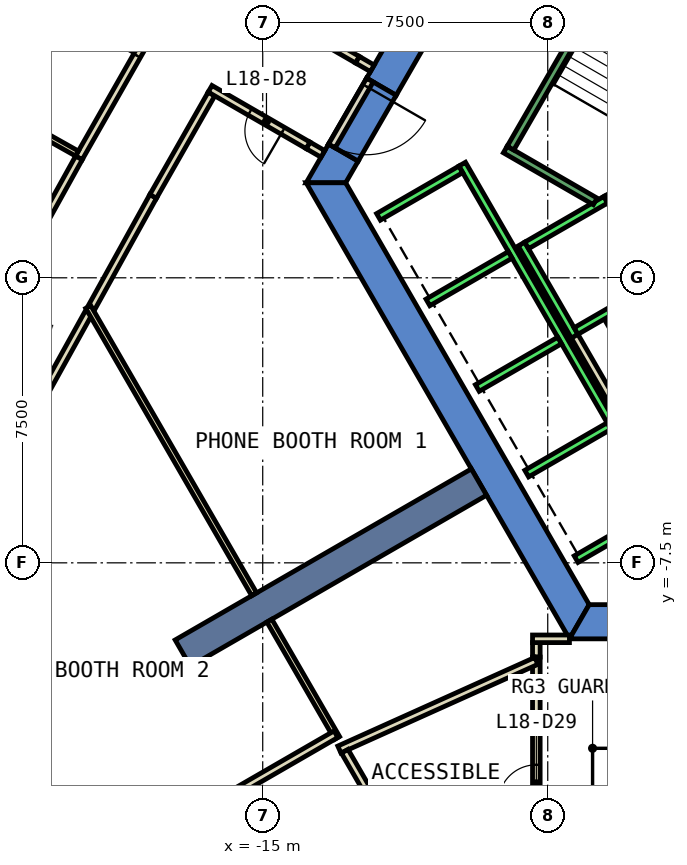
"""IFC4 building model, lengths in metres.
Left out: names, types, materials, properties, quantities, classifications, styles, units other than length and angle.
Written with IfcOpenShell. Run it as: python <this file> out.ifc"""

import sys

from ifc_helpers import new_model, si_unit, direction, frame, frame_2d, origin, place, context, subcontext, project, spatial, polyline, rectangle, outline, extrude, element, fill, save


model = new_model("IFC4")
c1 = context("Model", 3, precision=1e-05, world=origin(), true_north=direction((0.0, 1.0)))
c2 = subcontext(c1, "Body", "Model", "MODEL_VIEW")
j1 = project(units=[si_unit("LENGTHUNIT", "METRE"), si_unit("PLANEANGLEUNIT", "RADIAN")], contexts=[c1])
p1 = place(None, origin())
s1 = spatial("IfcSite", under=j1, at=p1, CompositionType="ELEMENT")
p2 = place(p1, origin())
s2 = spatial("IfcBuilding", under=s1, at=p2, CompositionType="ELEMENT")
p3 = place(p2, frame((0.0, 0.0, 86.6)))
s3 = spatial("IfcBuildingStorey", under=s2, at=p3, CompositionType="ELEMENT", Elevation=86.6)
p4 = place(p3, frame((0.0, 0.0, -0.6)))
e1 = element("IfcWall", 1, at=p4, inside=s3, PredefinedType="SHEAR", context=c2, shape_type="SweptSolid", body=[
    extrude(outline(polyline([(-12.267, 5.252), (-11.488, 4.802), (-6.409, 13.6), (-6.928, 14.5), (-12.267, 5.252)])), origin(), (0.0, 0.0, 1.0), 4.4),
])
p5 = place(p3, frame((0.0, 0.0, -0.6)))
e2 = element("IfcWall", 2, at=p5, inside=s3, PredefinedType="SHEAR", context=c2, shape_type="SweptSolid", body=[
    extrude(outline(polyline([(-12.488, 3.07), (-13.267, 3.52), (-13.856, 2.5), (-12.817, 2.5), (-12.488, 3.07)])), origin(), (0.0, 0.0, 1.0), 4.4),
])
p6 = place(p3, frame((0.0, 0.0, 3.6)))
e3 = element("IfcWall", 3, at=p6, inside=s3, PredefinedType="SHEAR", context=c2, shape_type="SweptSolid", body=[
    extrude(outline(polyline([(-13.267, 3.52), (-12.488, 3.07), (-11.488, 4.802), (-12.267, 5.252), (-13.267, 3.52)])), origin(), (0.0, 0.0, 1.0), 0.2),
])
p7 = place(p3, frame((0.0, 0.0, -0.6)))
e4 = element("IfcWall", 4, at=p7, inside=s3, PredefinedType="SHEAR", context=c2, shape_type="SweptSolid", body=[
    extrude(outline(polyline([(-13.856, 2.5), (-6.928, -9.5), (-6.409, -8.6), (-12.817, 2.5), (-13.856, 2.5)])), origin(), (0.0, 0.0, 1.0), 4.4),
])
p8 = place(p3, frame((0.0, 0.0, -0.6)))
e5 = element("IfcWall", 5, at=p8, inside=s3, PredefinedType="SHEAR", context=c2, shape_type="SweptSolid", body=[
    extrude(outline(polyline([(3.75, -9.5), (3.75, -8.6), (-6.409, -8.6), (-6.928, -9.5), (3.75, -9.5)])), origin(), (0.0, 0.0, 1.0), 4.4),
])
p9 = place(p3, frame((-9.31, -5.375, -0.6), z_axis=(0.0, 0.0, 1.0), x_axis=(-0.866017533419, -0.500013631625, 0.0)))
e6 = element("IfcWall", 6, at=p9, inside=s3, PredefinedType="SHEAR", context=c2, shape_type="SweptSolid", body=[
    extrude(rectangle(XDim=9.0, YDim=0.8, at=frame_2d((4.5, 0.0))), origin(), (0.0, 0.0, 1.0), 4.4),
])
p10 = place(p3, frame((-15.098, 7.233, 0.0), z_axis=(0.0, 0.0, 1.0), x_axis=(0.866101363304, -0.499868411168, 0.0)))
e7 = element("IfcWall", 7, at=p10, inside=s3, PredefinedType="PARTITIONING", context=c2, shape_type="SweptSolid", body=[
    extrude(rectangle(XDim=2.992, YDim=0.2, at=frame_2d((1.496, 0.0))), origin(), (0.0, 0.0, 1.0), 3.8),
])
p11 = place(p3, frame((-17.883, 2.143, 0.0), z_axis=(0.0, 0.0, 1.0), x_axis=(-0.484695523805, -0.874682942101, 0.0)))
e8 = element("IfcWall", 8, at=p11, inside=s3, PredefinedType="PARTITIONING", context=c2, shape_type="SweptSolid", body=[
    extrude(rectangle(XDim=3.349, YDim=0.2, at=frame_2d((1.674, 0.0))), origin(), (0.0, 0.0, 1.0), 3.8),
])
p12 = place(p3, frame((-13.417, 3.26, 0.0), z_axis=(0.0, 0.0, 1.0), x_axis=(-0.866032067792, 0.499988457423, 0.0)))
e9 = element("IfcWall", 9, at=p12, inside=s3, PredefinedType="PARTITIONING", context=c2, shape_type="SweptSolid", body=[
    extrude(rectangle(XDim=0.45, YDim=0.2, at=frame_2d((0.225, 0.0))), origin(), (0.0, 0.0, 1.0), 2.4),
])
p13 = place(p3, frame((-16.348, 4.837, 0.0), z_axis=(0.0, 0.0, 1.0), x_axis=(-0.495121026513, -0.868824015037, 0.0)))
e10 = element("IfcWall", 10, at=p13, inside=s3, PredefinedType="PARTITIONING", context=c2, shape_type="SweptSolid", body=[
    extrude(rectangle(XDim=3.101, YDim=0.2, at=frame_2d((1.55, 0.0))), origin(), (0.0, 0.0, 1.0), 3.8),
])
p14 = place(p3, frame((-19.579, -0.917, 0.0), z_axis=(0.0, 0.0, 1.0), x_axis=(-0.484700239797, -0.874680328772, 0.0)))
e11 = element("IfcWall", 11, at=p14, inside=s3, PredefinedType="PARTITIONING", context=c2, shape_type="SweptSolid", body=[
    extrude(rectangle(XDim=3.585, YDim=0.2, at=frame_2d((1.792, 0.0))), origin(), (0.0, 0.0, 1.0), 3.8),
])
p15 = place(p3, frame((-19.838, 3.156, 0.0), z_axis=(0.0, 0.0, 1.0), x_axis=(0.494978648769, 0.868905137091, 0.0)))
e12 = element("IfcWall", 12, at=p15, inside=s3, PredefinedType="PARTITIONING", context=c2, shape_type="SweptSolid", body=[
    extrude(rectangle(XDim=7.186, YDim=0.2, at=frame_2d((3.593, 0.0))), origin(), (0.0, 0.0, 1.0), 3.8),
])
p16 = place(p15, frame((3.093, 0.0, 0.0)))
e13 = element("IfcOpeningElement", 13, at=p16, cuts=e12, PredefinedType="OPENING", context=c2, shape_type="SweptSolid", body=[
    extrude(rectangle(XDim=1.0, YDim=2.1, at=frame_2d((0.5, 1.05))), frame((0.0, 0.11, 0.0), z_axis=(0.0, -1.0, 0.0), x_axis=(1.0, 0.0, 0.0)), (0.0, 0.0, 1.0), 0.22),
])
p17 = place(p3, frame((-23.284, -3.064, 0.0), z_axis=(0.0, 0.0, 1.0), x_axis=(0.48478560119, 0.874633020689, 0.0)))
e14 = element("IfcWall", 14, at=p17, inside=s3, PredefinedType="PARTITIONING", context=c2, shape_type="SweptSolid", body=[
    extrude(rectangle(XDim=7.11, YDim=0.2, at=frame_2d((3.555, 0.0))), origin(), (0.0, 0.0, 1.0), 3.8),
])
p18 = place(p17, frame((3.13, 0.0, 0.0)))
e15 = element("IfcOpeningElement", 15, at=p18, cuts=e14, PredefinedType="OPENING", context=c2, shape_type="SweptSolid", body=[
    extrude(rectangle(XDim=1.0, YDim=2.1, at=frame_2d((0.5, 1.05))), frame((0.0, 0.11, 0.0), z_axis=(0.0, -1.0, 0.0), x_axis=(1.0, 0.0, 0.0)), (0.0, 0.0, 1.0), 0.22),
])
p19 = place(p3, frame((-5.126, -2.422, 0.0), z_axis=(0.0, 0.0, 1.0), x_axis=(-0.500062241894, 0.865989465428, 0.0)))
e16 = element("IfcWall", 16, at=p19, inside=s3, PredefinedType="PARTITIONING", context=c2, shape_type="SweptSolid", body=[
    extrude(rectangle(XDim=1.7, YDim=0.2, at=frame_2d((0.85, 0.0))), origin(), (0.0, 0.0, 1.0), 3.8),
])
p20 = place(p3, frame((-5.492, -3.788, 0.0), z_axis=(0.0, 0.0, 1.0), x_axis=(-0.500008949224, 0.866020236886, 0.0)))
e17 = element("IfcWall", 17, at=p20, inside=s3, PredefinedType="PARTITIONING", context=c2, shape_type="SweptSolid", body=[
    extrude(rectangle(XDim=2.68, YDim=0.2, at=frame_2d((1.34, 0.0))), origin(), (0.0, 0.0, 1.0), 3.8),
])
p21 = place(p3, frame((-7.8, -9.98, 0.0), z_axis=(0.0, 0.0, 1.0), x_axis=(0.0, 1.0, 0.0)))
e18 = element("IfcWall", 18, at=p21, inside=s3, PredefinedType="PARTITIONING", context=c2, shape_type="SweptSolid", body=[
    extrude(rectangle(XDim=0.381, YDim=0.2, at=frame_2d((0.19, 0.0))), origin(), (0.0, 0.0, 1.0), 3.8),
])
p22 = place(p3, frame((-7.9, -9.499, 0.0), z_axis=(0.0, 0.0, 1.0), x_axis=(1.0, 0.0, 0.0)))
e19 = element("IfcWall", 19, at=p22, inside=s3, PredefinedType="PARTITIONING", context=c2, shape_type="SweptSolid", body=[
    extrude(rectangle(XDim=0.971, YDim=0.2, at=frame_2d((0.485, 0.0))), origin(), (0.0, 0.0, 1.0), 3.8),
])
p23 = place(p3, frame((-7.8, -16.649, 0.0), z_axis=(0.0, 0.0, 1.0), x_axis=(0.0, 1.0, 0.0)))
e20 = element("IfcWall", 20, at=p23, inside=s3, PredefinedType="PARTITIONING", context=c2, shape_type="SweptSolid", body=[
    extrude(rectangle(XDim=6.669, YDim=0.2, at=frame_2d((3.334, 0.0))), origin(), (0.0, 0.0, 1.0), 3.8),
])
p24 = place(p23, frame((2.835, 0.0, 0.0)))
e21 = element("IfcOpeningElement", 21, at=p24, cuts=e20, PredefinedType="OPENING", context=c2, shape_type="SweptSolid", body=[
    extrude(rectangle(XDim=1.0, YDim=2.1, at=frame_2d((0.5, 1.05))), frame((0.0, 0.11, 0.0), z_axis=(0.0, -1.0, 0.0), x_axis=(1.0, 0.0, 0.0)), (0.0, 0.0, 1.0), 0.22),
])
p25 = place(p3, frame((-7.8, -10.08, 0.0), z_axis=(0.0, 0.0, 1.0), x_axis=(-0.911938383636, -0.410327167577, 0.0)))
e22 = element("IfcWall", 22, at=p25, inside=s3, PredefinedType="PARTITIONING", context=c2, shape_type="SweptSolid", body=[
    extrude(rectangle(XDim=5.683, YDim=0.2, at=frame_2d((2.842, 0.0))), origin(), (0.0, 0.0, 1.0), 3.8),
])
p26 = place(p3, frame((-13.043, -12.108, 0.0), z_axis=(0.0, 0.0, 1.0), x_axis=(-0.499947764329, 0.866055559963, 0.0)))
e23 = element("IfcWall", 23, at=p26, inside=s3, PredefinedType="PARTITIONING", context=c2, shape_type="SweptSolid", body=[
    extrude(rectangle(XDim=3.564, YDim=0.15, at=frame_2d((1.782, 0.0))), origin(), (0.0, 0.0, 1.0), 3.8),
])
p27 = place(p3, frame((-10.458, -16.586, 0.0), z_axis=(0.0, 0.0, 1.0), x_axis=(-0.500121439648, 0.865955279218, 0.0)))
e24 = element("IfcWall", 24, at=p27, inside=s3, PredefinedType="PARTITIONING", context=c2, shape_type="SweptSolid", body=[
    extrude(rectangle(XDim=4.767, YDim=0.2, at=frame_2d((2.383, 0.0))), origin(), (0.0, 0.0, 1.0), 3.8),
])
p28 = place(p3, frame((-13.072, -12.009, 0.0), z_axis=(0.0, 0.0, 1.0), x_axis=(-0.865993734772, -0.500054848326, 0.0)))
e25 = element("IfcWall", 25, at=p28, inside=s3, PredefinedType="PARTITIONING", context=c2, shape_type="SweptSolid", body=[
    extrude(rectangle(XDim=8.583, YDim=0.2, at=frame_2d((4.292, 0.0))), origin(), (0.0, 0.0, 1.0), 3.8),
])
p29 = place(p3, frame((-19.888, 3.27, 0.0), z_axis=(0.0, 0.0, 1.0), x_axis=(-0.871789386467, 0.489880868828, 0.0)))
e26 = element("IfcWall", 26, at=p29, inside=s3, PredefinedType="PARTITIONING", context=c2, shape_type="SweptSolid", body=[
    extrude(rectangle(XDim=5.73, YDim=0.15, at=frame_2d((2.865, 0.0))), origin(), (0.0, 0.0, 1.0), 3.8),
])
p30 = place(p3, frame((-12.18, 5.202, 0.0), z_axis=(0.0, 0.0, 1.0), x_axis=(-0.50002537861, -0.866010750942, 0.0)))
e27 = element("IfcWall", 27, at=p30, inside=s3, PredefinedType="PARTITIONING", context=c2, shape_type="SweptSolid", body=[
    extrude(rectangle(XDim=2.0, YDim=0.2, at=frame_2d((1.0, 0.0))), origin(), (0.0, 0.0, 1.0), 2.4),
])
p31 = place(p30, frame((0.19, 0.0, 0.0)))
e28 = element("IfcOpeningElement", 28, at=p31, cuts=e27, PredefinedType="OPENING", context=c2, shape_type="SweptSolid", body=[
    extrude(rectangle(XDim=1.8, YDim=2.1, at=frame_2d((0.9, 1.05))), frame((0.0, 0.11, 0.0), z_axis=(0.0, -1.0, 0.0), x_axis=(1.0, 0.0, 0.0)), (0.0, 0.0, 1.0), 0.22),
])
p32 = place(p3, frame((-15.225, -8.328, 0.0), z_axis=(0.0, 0.0, 1.0), x_axis=(-0.500038648455, 0.866003088939, 0.0)))
e29 = element("IfcWall", 29, at=p32, inside=s3, PredefinedType="PARTITIONING", context=c2, shape_type="SweptSolid", body=[
    extrude(rectangle(XDim=8.733, YDim=0.15, at=frame_2d((4.367, 0.0))), origin(), (0.0, 0.0, 1.0), 3.8),
])
p33 = place(p3, frame((-12.506, 5.737, 0.0), z_axis=(0.0, 0.0, 1.0), x_axis=(0.865624510465, -0.500693725627, 0.0)))
e30 = element("IfcWall", 30, at=p33, inside=s3, PredefinedType="PARTITIONING", context=c2, shape_type="SweptSolid", body=[
    extrude(rectangle(XDim=0.449, YDim=0.2, at=frame_2d((0.225, 0.0))), origin(), (0.0, 0.0, 1.0), 2.4),
])
p34 = place(p3, frame((-13.807, 3.485, 0.0), z_axis=(0.0, 0.0, 1.0), x_axis=(-0.865947944451, 0.500134139508, 0.0)))
e31 = element("IfcWall", 31, at=p34, inside=s3, PredefinedType="PARTITIONING", context=c2, shape_type="SweptSolid", body=[
    extrude(rectangle(XDim=2.977, YDim=0.2, at=frame_2d((1.489, 0.0))), origin(), (0.0, 0.0, 1.0), 3.8),
])
p35 = place(p34, frame((0.764, 0.0, 0.0)))
e32 = element("IfcOpeningElement", 32, at=p35, cuts=e31, PredefinedType="OPENING", context=c2, shape_type="SweptSolid", body=[
    extrude(rectangle(XDim=1.0, YDim=2.1, at=frame_2d((0.5, 1.05))), frame((0.0, 0.11, 0.0), z_axis=(0.0, -1.0, 0.0), x_axis=(1.0, 0.0, 0.0)), (0.0, 0.0, 1.0), 0.22),
])
p36 = place(p3, frame((-5.94, 2.188, 0.0), z_axis=(0.0, 0.0, 1.0), x_axis=(0.49994636267, -0.866056369097, 0.0)))
e33 = element("IfcWall", 33, at=p36, inside=s3, PredefinedType="STANDARD", context=c2, shape_type="SweptSolid", body=[
    extrude(rectangle(XDim=2.8, YDim=0.2, at=frame_2d((1.4, 0.0))), origin(), (0.0, 0.0, 1.0), 3.8),
])
p37 = place(p36, frame((1.225, 0.0, 0.0)))
e34 = element("IfcOpeningElement", 34, at=p37, cuts=e33, PredefinedType="OPENING", context=c2, shape_type="SweptSolid", body=[
    extrude(rectangle(XDim=1.1, YDim=2.1, at=frame_2d((0.55, 1.05))), frame((0.0, 0.11, 0.0), z_axis=(0.0, -1.0, 0.0), x_axis=(1.0, 0.0, 0.0)), (0.0, 0.0, 1.0), 0.22),
])
p38 = place(p3, frame((-8.192, 0.888, 0.0), z_axis=(0.0, 0.0, 1.0), x_axis=(0.49994636267, -0.866056369097, 0.0)))
e35 = element("IfcWall", 35, at=p38, inside=s3, PredefinedType="STANDARD", context=c2, shape_type="SweptSolid", body=[
    extrude(rectangle(XDim=2.8, YDim=0.2, at=frame_2d((1.4, 0.0))), origin(), (0.0, 0.0, 1.0), 3.8),
])
for number, where, z_axis, x_axis in (
    (36, (-5.977, 2.052, 0.0), (0.0, 0.0, 1.0), (-0.866, -0.5, 0.0)),
    (37, (-4.677, -0.2, 0.0), (0.0, 0.0, 1.0), (-0.866, -0.5, 0.0)),
):
    element("IfcWall", number, at=place(p3, frame(where, z_axis=z_axis, x_axis=x_axis)), inside=s3, PredefinedType="STANDARD", context=c2, shape_type="SweptSolid", body=[
        extrude(rectangle(XDim=2.399, YDim=0.2, at=frame_2d((1.2, 0.0))), origin(), (0.0, 0.0, 1.0), 3.8),
    ])
p39 = place(p3, frame((-9.751, 2.99, 0.0), z_axis=(0.0, 0.0, 1.0), x_axis=(0.50000090737, -0.866024879913, 0.0)))
e38 = element("IfcWall", 38, at=p39, inside=s3, PredefinedType="STANDARD", context=c2, shape_type="SweptSolid", body=[
    extrude(rectangle(XDim=10.6, YDim=0.2, at=frame_2d((5.3, 0.0))), origin(), (0.0, 0.0, 1.0), 3.8),
])
p40 = place(p3, frame((-9.788, 2.853, 0.0), z_axis=(0.0, 0.0, 1.0), x_axis=(-0.865998541277, -0.500046524342, 0.0)))
e39 = element("IfcWall", 39, at=p40, inside=s3, PredefinedType="STANDARD", context=c2, shape_type="SweptSolid", body=[
    extrude(rectangle(XDim=2.5, YDim=0.2, at=frame_2d((1.25, 0.0))), origin(), (0.0, 0.0, 1.0), 3.8),
])
for number, where, z_axis, x_axis in (
    (40, (-8.488, 0.602, 0.0), (0.0, 0.0, 1.0), (-0.866, -0.5, 0.0)),
    (41, (-7.188, -1.65, 0.0), (0.0, 0.0, 1.0), (-0.866, -0.5, 0.0)),
    (42, (-5.888, -3.902, 0.0), (0.0, 0.0, 1.0), (-0.866, -0.5, 0.0)),
    (43, (-4.588, -6.153, 0.0), (0.0, 0.0, 1.0), (-0.866, -0.5, 0.0)),
):
    element("IfcWall", number, at=place(p3, frame(where, z_axis=z_axis, x_axis=x_axis)), inside=s3, PredefinedType="STANDARD", context=c2, shape_type="SweptSolid", body=[
        extrude(rectangle(XDim=2.5, YDim=0.2, at=frame_2d((1.25, 0.0))), origin(), (0.0, 0.0, 1.0), 3.8),
    ])
p41 = place(p3, frame((-6.25, 2.01, 0.0), z_axis=(0.0, 0.0, 1.0), x_axis=(-0.86611865017, 0.499838457731, 0.0)))
e44 = element("IfcWall", 44, at=p41, inside=s3, PredefinedType="STANDARD", context=c2, shape_type="SweptSolid", body=[
    extrude(rectangle(XDim=2.733, YDim=0.2, at=frame_2d((1.366, 0.0))), origin(), (0.0, 0.0, 1.0), 3.8),
])
p42 = place(p3, frame((-5.03, 9.388, 0.0), z_axis=(0.0, 0.0, 1.0), x_axis=(-0.499978703459, -0.866037698999, 0.0)))
e45 = element("IfcWall", 45, at=p42, inside=s3, PredefinedType="STANDARD", context=c2, shape_type="SweptSolid", body=[
    extrude(rectangle(XDim=6.9, YDim=0.2, at=frame_2d((3.45, 0.0))), origin(), (0.0, 0.0, 1.0), 3.8),
])
p43 = place(p16, origin())
e46 = element("IfcDoor", 46, at=p43, inside=s3, OperationType="SINGLE_SWING_LEFT", PredefinedType="DOOR", context=c2, shape_type="SweptSolid", body=[
    extrude(rectangle(XDim=1.0, YDim=2.1, at=frame_2d((0.5, 1.05))), frame((0.0, 0.025, 0.0), z_axis=(0.0, -1.0, 0.0), x_axis=(1.0, 0.0, 0.0)), (0.0, 0.0, 1.0), 0.05),
])
fill(e13, e46)
p44 = place(p35, origin())
e47 = element("IfcDoor", 47, at=p44, inside=s3, OperationType="SINGLE_SWING_LEFT", PredefinedType="DOOR", context=c2, shape_type="SweptSolid", body=[
    extrude(rectangle(XDim=1.0, YDim=2.1, at=frame_2d((0.5, 1.05))), frame((0.0, 0.025, 0.0), z_axis=(0.0, -1.0, 0.0), x_axis=(1.0, 0.0, 0.0)), (0.0, 0.0, 1.0), 0.05),
])
fill(e32, e47)
p45 = place(p24, origin())
e48 = element("IfcDoor", 48, at=p45, inside=s3, OperationType="SINGLE_SWING_LEFT", PredefinedType="DOOR", context=c2, shape_type="SweptSolid", body=[
    extrude(rectangle(XDim=1.0, YDim=2.1, at=frame_2d((0.5, 1.05))), frame((0.0, 0.025, 0.0), z_axis=(0.0, -1.0, 0.0), x_axis=(1.0, 0.0, 0.0)), (0.0, 0.0, 1.0), 0.05),
])
fill(e21, e48)
p46 = place(p31, origin())
e49 = element("IfcDoor", 49, at=p46, inside=s3, OperationType="DOUBLE_DOOR_SINGLE_SWING", PredefinedType="DOOR", context=c2, shape_type="SweptSolid", body=[
    extrude(rectangle(XDim=1.8, YDim=2.1, at=frame_2d((0.9, 1.05))), frame((0.0, 0.025, 0.0), z_axis=(0.0, -1.0, 0.0), x_axis=(1.0, 0.0, 0.0)), (0.0, 0.0, 1.0), 0.05),
])
fill(e28, e49)
save(model, sys.argv[1])
